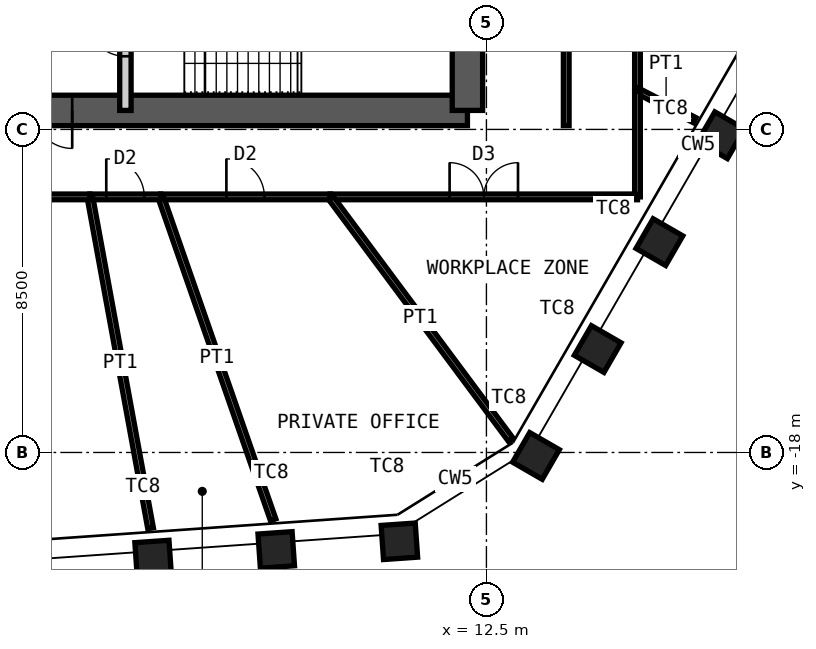
"""IFC4 building model, lengths in metres.
Left out: names, types, materials, properties, quantities, classifications, styles, units other than length and angle.
Written with IfcOpenShell. Run it as: python <this file> out.ifc"""

import sys

from ifc_helpers import new_model, si_unit, direction, frame, frame_2d, origin, origin_2d, place, context, subcontext, project, spatial, rectangle, hollow_rectangle, extrude, element, fill, save


model = new_model("IFC4")
c1 = context("Model", 3, precision=1e-05, world=origin(), true_north=direction((0.0, 1.0)))
c2 = subcontext(c1, "Body", "Model", "MODEL_VIEW")
j1 = project(units=[si_unit("LENGTHUNIT", "METRE"), si_unit("PLANEANGLEUNIT", "RADIAN")], contexts=[c1])
p1 = place(None, origin())
s1 = spatial("IfcSite", under=j1, at=p1, CompositionType="ELEMENT")
p2 = place(p1, origin())
s2 = spatial("IfcBuilding", under=s1, at=p2, CompositionType="ELEMENT")
p3 = place(p2, frame((0.0, 0.0, 316.6)))
s3 = spatial("IfcBuildingStorey", under=s2, at=p3, CompositionType="ELEMENT", Elevation=316.6)
for number, where, z_axis, x_axis in (
    (1, (18.676, -9.653, 0.0), (0.0, 0.0, 1.0), (0.5, 0.866, 0.0)),
    (2, (17.052, -12.466, 0.0), (0.0, 0.0, 1.0), (0.5, 0.866, 0.0)),
    (3, (15.427, -15.279, 0.0), (0.0, 0.0, 1.0), (0.5, 0.866, 0.0)),
    (4, (13.803, -18.092, 0.0), (0.0, 0.0, 1.0), (0.5, 0.866, 0.0)),
    (5, (10.209, -20.337, 0.0), (0.0, 0.0, 1.0), (0.998, 0.07, 0.0)),
    (6, (6.969, -20.564, 0.0), (0.0, 0.0, 1.0), (0.998, 0.07, 0.0)),
    (7, (3.729, -20.791, 0.0), (0.0, 0.0, 1.0), (0.998, 0.07, 0.0)),
):
    element("IfcColumn", number, at=place(p3, frame(where, z_axis=z_axis, x_axis=x_axis)), inside=s3, PredefinedType="COLUMN", context=c2, shape_type="SweptSolid", body=[
        extrude(hollow_rectangle(XDim=0.9, YDim=0.9, WallThickness=0.05, at=origin_2d()), origin(), (0.0, 0.0, 1.0), 4.2),
    ])
p4 = place(p3, frame((-12.0, -9.0, 0.0), z_axis=(0.0, 0.0, 1.0), x_axis=(1.0, 0.0, 0.0)))
e8 = element("IfcWall", 8, at=p4, inside=s3, PredefinedType="SHEAR", context=c2, shape_type="SweptSolid", body=[
    extrude(rectangle(XDim=24.0, YDim=0.8, at=frame_2d((12.0, 0.0))), origin(), (0.0, 0.0, 1.0), 4.2),
])
p5 = place(p4, frame((1.35, 0.0, 0.0)))
e9 = element("IfcOpeningElement", 9, at=p5, cuts=e8, PredefinedType="OPENING", context=c2, shape_type="SweptSolid", body=[
    extrude(rectangle(XDim=1.0, YDim=2.1, at=frame_2d((0.5, 1.05))), frame((0.0, 0.41, 0.0), z_axis=(0.0, -1.0, 0.0), x_axis=(1.0, 0.0, 0.0)), (0.0, 0.0, 1.0), 0.82),
])
p6 = place(p4, frame((5.325, 0.0, 0.0)))
e10 = element("IfcOpeningElement", 10, at=p6, cuts=e8, PredefinedType="OPENING", context=c2, shape_type="SweptSolid", body=[
    extrude(rectangle(XDim=1.15, YDim=2.1, at=frame_2d((0.575, 1.05))), frame((0.0, 0.41, 0.0), z_axis=(0.0, -1.0, 0.0), x_axis=(1.0, 0.0, 0.0)), (0.0, 0.0, 1.0), 0.82),
])
p7 = place(p4, frame((12.6, 0.0, 0.0)))
e11 = element("IfcOpeningElement", 11, at=p7, cuts=e8, PredefinedType="OPENING", context=c2, shape_type="SweptSolid", body=[
    extrude(rectangle(XDim=1.0, YDim=2.1, at=frame_2d((0.5, 1.05))), frame((0.0, 0.41, 0.0), z_axis=(0.0, -1.0, 0.0), x_axis=(1.0, 0.0, 0.0)), (0.0, 0.0, 1.0), 0.82),
])
p8 = place(p3, frame((12.0, -9.0, 0.0), z_axis=(0.0, 0.0, 1.0), x_axis=(0.0, 1.0, 0.0)))
e12 = element("IfcWall", 12, at=p8, inside=s3, PredefinedType="SHEAR", context=c2, shape_type="SweptSolid", body=[
    extrude(rectangle(XDim=18.0, YDim=0.8, at=frame_2d((9.0, 0.0))), origin(), (0.0, 0.0, 1.0), 4.2),
])
p9 = place(p8, frame((8.1, 0.0, 0.0)))
e13 = element("IfcOpeningElement", 13, at=p9, cuts=e12, PredefinedType="OPENING", context=c2, shape_type="SweptSolid", body=[
    extrude(rectangle(XDim=1.8, YDim=2.1, at=frame_2d((0.9, 1.05))), frame((0.0, 0.41, 0.0), z_axis=(0.0, -1.0, 0.0), x_axis=(1.0, 0.0, 0.0)), (0.0, 0.0, 1.0), 0.82),
])
p10 = place(p3, frame((3.0, -9.0, 0.0), z_axis=(0.0, 0.0, 1.0), x_axis=(0.0, 1.0, 0.0)))
e14 = element("IfcWall", 14, at=p10, inside=s3, PredefinedType="PARTITIONING", context=c2, shape_type="SweptSolid", body=[
    extrude(rectangle(XDim=3.85, YDim=0.3, at=frame_2d((1.925, 0.0))), origin(), (0.0, 0.0, 1.0), 3.98),
])
p11 = place(p10, frame((1.425, 0.0, 0.0)))
e15 = element("IfcOpeningElement", 15, at=p11, cuts=e14, PredefinedType="OPENING", context=c2, shape_type="SweptSolid", body=[
    extrude(rectangle(XDim=1.0, YDim=2.1, at=frame_2d((0.5, 1.05))), frame((0.0, 0.16, 0.0), z_axis=(0.0, -1.0, 0.0), x_axis=(1.0, 0.0, 0.0)), (0.0, 0.0, 1.0), 0.32),
])
p12 = place(p3, frame((16.475, 1.777, 0.0), z_axis=(0.0, 0.0, 1.0), x_axis=(0.0, -1.0, 0.0)))
e16 = element("IfcWall", 16, at=p12, inside=s3, PredefinedType="PARTITIONING", context=c2, shape_type="SweptSolid", body=[
    extrude(rectangle(XDim=10.259, YDim=0.15, at=frame_2d((5.13, 0.0))), origin(), (0.0, 0.0, 1.0), 4.03),
])
p13 = place(p12, frame((4.23, 0.0, 0.0)))
e17 = element("IfcOpeningElement", 17, at=p13, cuts=e16, PredefinedType="OPENING", context=c2, shape_type="SweptSolid", body=[
    extrude(rectangle(XDim=1.8, YDim=2.4, at=frame_2d((0.9, 1.2))), frame((0.0, 0.085, 0.0), z_axis=(0.0, -1.0, 0.0), x_axis=(1.0, 0.0, 0.0)), (0.0, 0.0, 1.0), 0.17),
])
p14 = place(p3, frame((17.98, -9.257, 0.0), z_axis=(0.0, 0.0, 1.0), x_axis=(-0.889058145064, 0.457794292991, 0.0)))
e18 = element("IfcWall", 18, at=p14, inside=s3, PredefinedType="PARTITIONING", context=c2, shape_type="SweptSolid", body=[
    extrude(rectangle(XDim=1.693, YDim=0.15, at=frame_2d((0.847, 0.0))), origin(), (0.0, 0.0, 1.0), 3.33),
])
p15 = place(p3, frame((16.475, -8.482, 0.0), z_axis=(0.0, 0.0, 1.0), x_axis=(0.0, -1.0, 0.0)))
e19 = element("IfcWall", 19, at=p15, inside=s3, PredefinedType="PARTITIONING", context=c2, shape_type="SweptSolid", body=[
    extrude(rectangle(XDim=2.793, YDim=0.15, at=frame_2d((1.396, 0.0))), origin(), (0.0, 0.0, 1.0), 4.03),
])
p16 = place(p3, frame((16.475, -11.275, 0.0), z_axis=(0.0, 0.0, 1.0), x_axis=(-1.0, 0.0, 0.0)))
e20 = element("IfcWall", 20, at=p16, inside=s3, PredefinedType="PARTITIONING", context=c2, shape_type="SweptSolid", body=[
    extrude(rectangle(XDim=8.088, YDim=0.15, at=frame_2d((4.044, 0.0))), origin(), (0.0, 0.0, 1.0), 4.03),
])
p17 = place(p16, frame((3.144, 0.0, 0.0)))
e21 = element("IfcOpeningElement", 21, at=p17, cuts=e20, PredefinedType="OPENING", context=c2, shape_type="SweptSolid", body=[
    extrude(rectangle(XDim=1.8, YDim=2.4, at=frame_2d((0.9, 1.2))), frame((0.0, 0.085, 0.0), z_axis=(0.0, -1.0, 0.0), x_axis=(1.0, 0.0, 0.0)), (0.0, 0.0, 1.0), 0.17),
])
p18 = place(p3, frame((13.138, -17.661, 0.0), z_axis=(0.0, 0.0, 1.0), x_axis=(-0.596829877953, 0.802367806422, 0.0)))
e22 = element("IfcWall", 22, at=p18, inside=s3, PredefinedType="PARTITIONING", context=c2, shape_type="SweptSolid", body=[
    extrude(rectangle(XDim=7.959, YDim=0.15, at=frame_2d((3.98, 0.0))), origin(), (0.0, 0.0, 1.0), 2.93),
])
p19 = place(p3, frame((8.387, -11.275, 0.0), z_axis=(0.0, 0.0, 1.0), x_axis=(-1.0, 0.0, 0.0)))
e23 = element("IfcWall", 23, at=p19, inside=s3, PredefinedType="PARTITIONING", context=c2, shape_type="SweptSolid", body=[
    extrude(rectangle(XDim=4.459, YDim=0.15, at=frame_2d((2.23, 0.0))), origin(), (0.0, 0.0, 1.0), 4.03),
])
p20 = place(p19, frame((1.73, 0.0, 0.0)))
e24 = element("IfcOpeningElement", 24, at=p20, cuts=e23, PredefinedType="OPENING", context=c2, shape_type="SweptSolid", body=[
    extrude(rectangle(XDim=1.0, YDim=2.4, at=frame_2d((0.5, 1.2))), frame((0.0, 0.085, 0.0), z_axis=(0.0, -1.0, 0.0), x_axis=(1.0, 0.0, 0.0)), (0.0, 0.0, 1.0), 0.17),
])
p21 = place(p3, frame((6.888, -19.771, 0.0), z_axis=(0.0, 0.0, 1.0), x_axis=(-0.328987878601, 0.944334144111, 0.0)))
e25 = element("IfcWall", 25, at=p21, inside=s3, PredefinedType="PARTITIONING", context=c2, shape_type="SweptSolid", body=[
    extrude(rectangle(XDim=8.997, YDim=0.15, at=frame_2d((4.499, 0.0))), origin(), (0.0, 0.0, 1.0), 3.33),
])
p22 = place(p3, frame((3.928, -11.275, 0.0), z_axis=(0.0, 0.0, 1.0), x_axis=(-1.0, 0.0, 0.0)))
e26 = element("IfcWall", 26, at=p22, inside=s3, PredefinedType="PARTITIONING", context=c2, shape_type="SweptSolid", body=[
    extrude(rectangle(XDim=1.863, YDim=0.15, at=frame_2d((0.931, 0.0))), origin(), (0.0, 0.0, 1.0), 4.03),
])
p23 = place(p22, frame((0.431, 0.0, 0.0)))
e27 = element("IfcOpeningElement", 27, at=p23, cuts=e26, PredefinedType="OPENING", context=c2, shape_type="SweptSolid", body=[
    extrude(rectangle(XDim=1.0, YDim=2.4, at=frame_2d((0.5, 1.2))), frame((0.0, 0.085, 0.0), z_axis=(0.0, -1.0, 0.0), x_axis=(1.0, 0.0, 0.0)), (0.0, 0.0, 1.0), 0.17),
])
p24 = place(p3, frame((3.662, -19.994, 0.0), z_axis=(0.0, 0.0, 1.0), x_axis=(-0.180184416856, 0.983632846098, 0.0)))
e28 = element("IfcWall", 28, at=p24, inside=s3, PredefinedType="PARTITIONING", context=c2, shape_type="SweptSolid", body=[
    extrude(rectangle(XDim=8.864, YDim=0.15, at=frame_2d((4.432, 0.0))), origin(), (0.0, 0.0, 1.0), 3.33),
])
p25 = place(p3, frame((2.065, -11.275, 0.0), z_axis=(0.0, 0.0, 1.0), x_axis=(-1.0, 0.0, 0.0)))
e29 = element("IfcWall", 29, at=p25, inside=s3, PredefinedType="PARTITIONING", context=c2, shape_type="SweptSolid", body=[
    extrude(rectangle(XDim=7.048, YDim=0.15, at=frame_2d((3.524, 0.0))), origin(), (0.0, 0.0, 1.0), 4.03),
])
p26 = place(p25, frame((2.624, 0.0, 0.0)))
e30 = element("IfcOpeningElement", 30, at=p26, cuts=e29, PredefinedType="OPENING", context=c2, shape_type="SweptSolid", body=[
    extrude(rectangle(XDim=1.8, YDim=2.4, at=frame_2d((0.9, 1.2))), frame((0.0, 0.085, 0.0), z_axis=(0.0, -1.0, 0.0), x_axis=(1.0, 0.0, 0.0)), (0.0, 0.0, 1.0), 0.17),
])
p27 = place(p3, frame((14.6, -9.4, 0.0), z_axis=(0.0, 0.0, 1.0), x_axis=(0.0, 1.0, 0.0)))
e31 = element("IfcWall", 31, at=p27, inside=s3, PredefinedType="PARTITIONING", context=c2, shape_type="SweptSolid", body=[
    extrude(rectangle(XDim=6.9, YDim=0.15, at=frame_2d((3.45, 0.0))), origin(), (0.0, 0.0, 1.0), 4.03),
])
p28 = place(p7, origin())
e32 = element("IfcDoor", 32, at=p28, inside=s3, OperationType="SINGLE_SWING_RIGHT", PredefinedType="DOOR", context=c2, shape_type="SweptSolid", body=[
    extrude(rectangle(XDim=1.0, YDim=2.1, at=frame_2d((0.5, 1.05))), frame((0.0, 0.025, 0.0), z_axis=(0.0, -1.0, 0.0), x_axis=(1.0, 0.0, 0.0)), (0.0, 0.0, 1.0), 0.05),
])
fill(e11, e32)
p29 = place(p11, origin())
e33 = element("IfcDoor", 33, at=p29, inside=s3, OperationType="SINGLE_SWING_LEFT", PredefinedType="DOOR", context=c2, shape_type="SweptSolid", body=[
    extrude(rectangle(XDim=1.0, YDim=2.1, at=frame_2d((0.5, 1.05))), frame((0.0, 0.025, 0.0), z_axis=(0.0, -1.0, 0.0), x_axis=(1.0, 0.0, 0.0)), (0.0, 0.0, 1.0), 0.05),
])
fill(e15, e33)
p30 = place(p17, origin())
e34 = element("IfcDoor", 34, at=p30, inside=s3, OperationType="DOUBLE_DOOR_DOUBLE_SWING", PredefinedType="DOOR", context=c2, shape_type="SweptSolid", body=[
    extrude(rectangle(XDim=1.8, YDim=2.4, at=frame_2d((0.9, 1.2))), frame((0.0, 0.025, 0.0), z_axis=(0.0, -1.0, 0.0), x_axis=(1.0, 0.0, 0.0)), (0.0, 0.0, 1.0), 0.05),
])
fill(e21, e34)
p31 = place(p20, origin())
e35 = element("IfcDoor", 35, at=p31, inside=s3, OperationType="SINGLE_SWING_RIGHT", PredefinedType="DOOR", context=c2, shape_type="SweptSolid", body=[
    extrude(rectangle(XDim=1.0, YDim=2.4, at=frame_2d((0.5, 1.2))), frame((0.0, 0.025, 0.0), z_axis=(0.0, -1.0, 0.0), x_axis=(1.0, 0.0, 0.0)), (0.0, 0.0, 1.0), 0.05),
])
fill(e24, e35)
p32 = place(p23, origin())
e36 = element("IfcDoor", 36, at=p32, inside=s3, OperationType="SINGLE_SWING_RIGHT", PredefinedType="DOOR", context=c2, shape_type="SweptSolid", body=[
    extrude(rectangle(XDim=1.0, YDim=2.4, at=frame_2d((0.5, 1.2))), frame((0.0, 0.025, 0.0), z_axis=(0.0, -1.0, 0.0), x_axis=(1.0, 0.0, 0.0)), (0.0, 0.0, 1.0), 0.05),
])
fill(e27, e36)
save(model, sys.argv[1])
